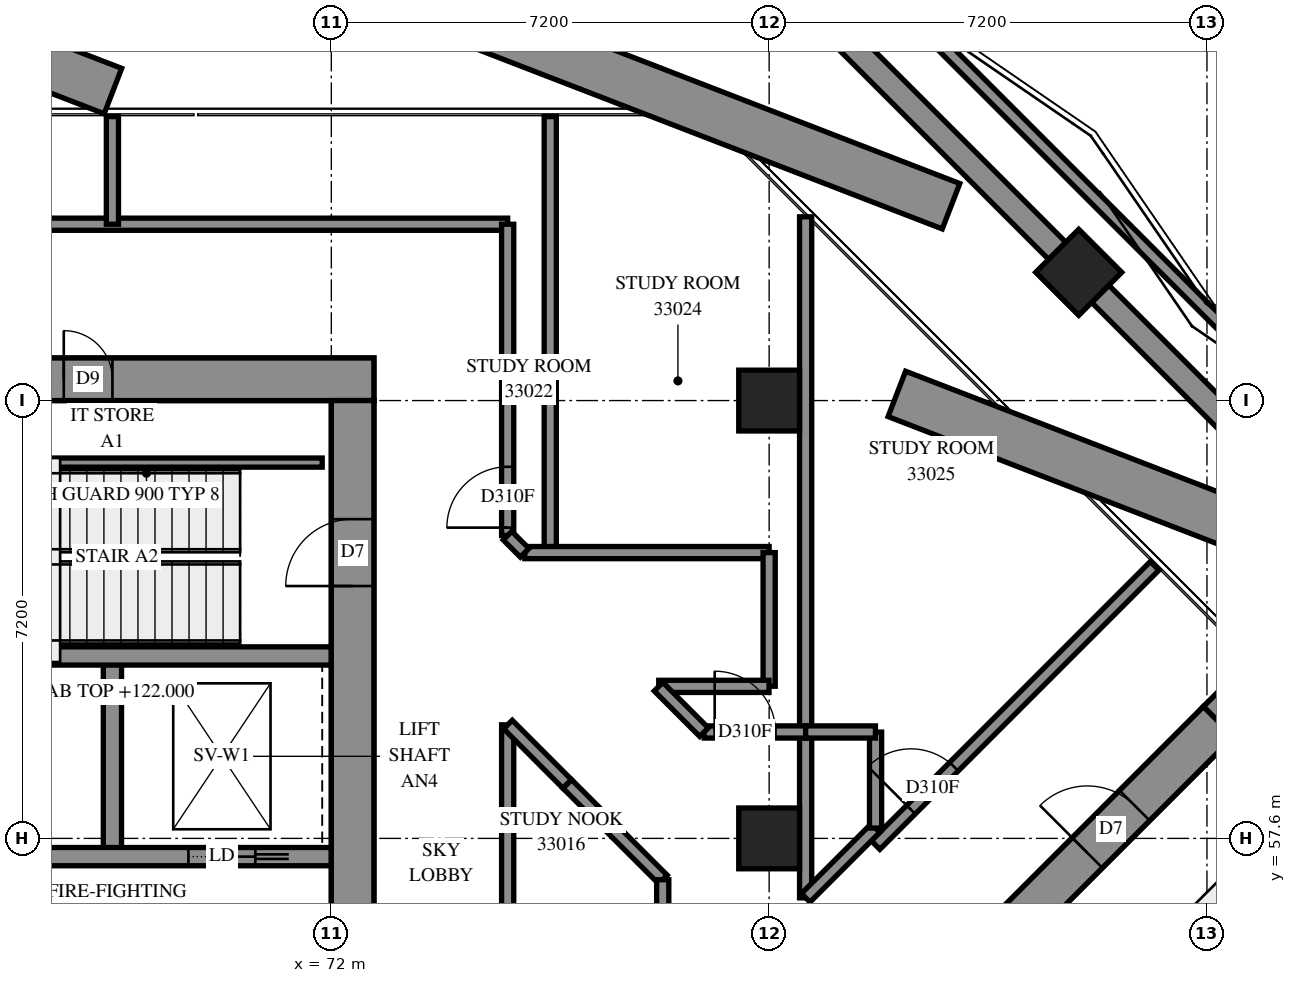
"""IFC4 building model, lengths in metres.
Left out: names, types, materials, properties, quantities, classifications, styles, units other than length and angle.
Written with IfcOpenShell. Run it as: python <this file> out.ifc"""

import sys

from ifc_helpers import new_model, si_unit, direction, frame, frame_2d, origin, origin_2d, place, context, subcontext, project, spatial, polyline, rectangle, outline, extrude, element, fill, save


model = new_model("IFC4")
c1 = context("Model", 3, precision=1e-05, world=origin(), true_north=direction((0.0, 1.0)))
c2 = subcontext(c1, "Body", "Model", "MODEL_VIEW")
j1 = project(units=[si_unit("LENGTHUNIT", "METRE"), si_unit("PLANEANGLEUNIT", "RADIAN")], contexts=[c1])
p1 = place(None, origin())
s1 = spatial("IfcSite", under=j1, at=p1, CompositionType="ELEMENT")
p2 = place(p1, origin())
s2 = spatial("IfcBuilding", under=s1, at=p2, CompositionType="ELEMENT")
p3 = place(p2, frame((0.0, 0.0, 122.0)))
s3 = spatial("IfcBuildingStorey", under=s2, at=p3, CompositionType="ELEMENT", Elevation=122.0)
for number, where, z_axis, x_axis in (
    (1, (79.2, 57.6, 0.0), (0.0, 0.0, 1.0), (1.0, 0.0, 0.0)),
    (2, (79.2, 64.8, 0.0), (0.0, 0.0, 1.0), (1.0, 0.0, 0.0)),
    (3, (84.291, 66.909, 0.0), (0.0, 0.0, 1.0), (0.707, -0.707, 0.0)),
):
    element("IfcColumn", number, at=place(p3, frame(where, z_axis=z_axis, x_axis=x_axis)), inside=s3, PredefinedType="COLUMN", context=c2, shape_type="SweptSolid", body=[
        extrude(rectangle(XDim=1.0, YDim=1.0, at=origin_2d()), origin(), (0.0, 0.0, 1.0), 3.9),
    ])
p4 = place(p3, frame((56.9, 65.15, -0.3), z_axis=(0.0, 0.0, 1.0), x_axis=(1.0, 0.0, 0.0)))
e4 = element("IfcWall", 4, at=p4, inside=s3, PredefinedType="SHEAR", context=c2, shape_type="SweptSolid", body=[
    extrude(rectangle(XDim=15.8, YDim=0.7, at=frame_2d((7.9, 0.0))), origin(), (0.0, 0.0, 1.0), 3.5),
])
p5 = place(p4, frame((10.7, 0.0, 0.3)))
e5 = element("IfcOpeningElement", 5, at=p5, cuts=e4, PredefinedType="OPENING", context=c2, shape_type="SweptSolid", body=[
    extrude(rectangle(XDim=0.8, YDim=2.1, at=frame_2d((0.4, 1.05))), frame((0.0, 0.36, 0.0), z_axis=(0.0, -1.0, 0.0), x_axis=(1.0, 0.0, 0.0)), (0.0, 0.0, 1.0), 0.72),
])
p6 = place(p3, frame((72.35, 50.4, -0.3), z_axis=(0.0, 0.0, 1.0), x_axis=(0.0, 1.0, 0.0)))
e6 = element("IfcWall", 6, at=p6, inside=s3, PredefinedType="SHEAR", context=c2, shape_type="SweptSolid", body=[
    extrude(rectangle(XDim=14.4, YDim=0.7, at=frame_2d((7.2, 0.0))), origin(), (0.0, 0.0, 1.0), 3.5),
])
p7 = place(p6, frame((4.55, 0.0, 0.3)))
e7 = element("IfcOpeningElement", 7, at=p7, cuts=e6, PredefinedType="OPENING", context=c2, shape_type="SweptSolid", body=[
    extrude(rectangle(XDim=1.1, YDim=2.1, at=frame_2d((0.55, 1.05))), frame((0.0, 0.36, 0.0), z_axis=(0.0, -1.0, 0.0), x_axis=(1.0, 0.0, 0.0)), (0.0, 0.0, 1.0), 0.72),
])
p8 = place(p6, frame((11.35, 0.0, 0.3)))
e8 = element("IfcOpeningElement", 8, at=p8, cuts=e6, PredefinedType="OPENING", context=c2, shape_type="SweptSolid", body=[
    extrude(rectangle(XDim=1.1, YDim=2.1, at=frame_2d((0.55, 1.05))), frame((0.0, 0.36, 0.0), z_axis=(0.0, -1.0, 0.0), x_axis=(1.0, 0.0, 0.0)), (0.0, 0.0, 1.0), 0.72),
])
p9 = place(p3, frame((68.4, 57.3, 0.0), z_axis=(0.0, 0.0, 1.0), x_axis=(0.0, 1.0, 0.0)))
e9 = element("IfcWall", 9, at=p9, inside=s3, PredefinedType="SOLIDWALL", context=c2, shape_type="SweptSolid", body=[
    extrude(rectangle(XDim=3.3, YDim=0.3, at=frame_2d((1.65, 0.0))), origin(), (0.0, 0.0, 1.0), 3.9),
])
p10 = place(p3, frame((57.6, 57.3, 0.0), z_axis=(0.0, 0.0, 1.0), x_axis=(1.0, 0.0, 0.0)))
e10 = element("IfcWall", 10, at=p10, inside=s3, PredefinedType="SOLIDWALL", context=c2, shape_type="SweptSolid", body=[
    extrude(rectangle(XDim=14.4, YDim=0.3, at=frame_2d((7.2, 0.0))), origin(), (0.0, 0.0, 1.0), 3.9),
])
p11 = place(p10, frame((12.05, 0.0, 0.0)))
e11 = element("IfcOpeningElement", 11, at=p11, cuts=e10, PredefinedType="OPENING", context=c2, shape_type="SweptSolid", body=[
    extrude(rectangle(XDim=1.1, YDim=2.1, at=frame_2d((0.55, 1.05))), frame((0.0, 0.16, 0.0), z_axis=(0.0, -1.0, 0.0), x_axis=(1.0, 0.0, 0.0)), (0.0, 0.0, 1.0), 0.32),
])
p12 = place(p3, frame((64.8, 60.6, 0.0), z_axis=(0.0, 0.0, 1.0), x_axis=(1.0, 0.0, 0.0)))
e12 = element("IfcWall", 12, at=p12, inside=s3, PredefinedType="SOLIDWALL", context=c2, shape_type="SweptSolid", body=[
    extrude(rectangle(XDim=7.2, YDim=0.3, at=frame_2d((3.6, 0.0))), origin(), (0.0, 0.0, 1.0), 3.9),
])
p13 = place(p3, frame((86.589, 60.014, -0.3), z_axis=(0.0, 0.0, 1.0), x_axis=(0.7071099457, -0.7071036166, 0.0)))
e13 = element("IfcWall", 13, at=p13, inside=s3, PredefinedType="SHEAR", context=c2, shape_type="SweptSolid", body=[
    extrude(rectangle(XDim=15.8, YDim=0.7, at=frame_2d((7.9, 0.0))), origin(), (0.0, 0.0, 1.0), 3.5),
])
p14 = place(p13, frame((10.7, 0.0, 0.3)))
e14 = element("IfcOpeningElement", 14, at=p14, cuts=e13, PredefinedType="OPENING", context=c2, shape_type="SweptSolid", body=[
    extrude(rectangle(XDim=0.8, YDim=2.1, at=frame_2d((0.4, 1.05))), frame((0.0, 0.36, 0.0), z_axis=(0.0, -1.0, 0.0), x_axis=(1.0, 0.0, 0.0)), (0.0, 0.0, 1.0), 0.72),
])
p15 = place(p3, frame((76.407, 49.337, -0.3), z_axis=(0.0, 0.0, 1.0), x_axis=(0.7071067812, 0.7071067812, 0.0)))
e15 = element("IfcWall", 15, at=p15, inside=s3, PredefinedType="SHEAR", context=c2, shape_type="SweptSolid", body=[
    extrude(rectangle(XDim=14.4, YDim=0.7, at=frame_2d((7.2, 0.0))), origin(), (0.0, 0.0, 1.0), 3.5),
])
p16 = place(p15, frame((4.55, 0.0, 0.3)))
e16 = element("IfcOpeningElement", 16, at=p16, cuts=e15, PredefinedType="OPENING", context=c2, shape_type="SweptSolid", body=[
    extrude(rectangle(XDim=1.1, YDim=2.1, at=frame_2d((0.55, 1.05))), frame((0.0, 0.36, 0.0), z_axis=(0.0, -1.0, 0.0), x_axis=(1.0, 0.0, 0.0)), (0.0, 0.0, 1.0), 0.72),
])
p17 = place(p15, frame((11.35, 0.0, 0.3)))
e17 = element("IfcOpeningElement", 17, at=p17, cuts=e15, PredefinedType="OPENING", context=c2, shape_type="SweptSolid", body=[
    extrude(rectangle(XDim=1.1, YDim=2.1, at=frame_2d((0.55, 1.05))), frame((0.0, 0.36, 0.0), z_axis=(0.0, -1.0, 0.0), x_axis=(1.0, 0.0, 0.0)), (0.0, 0.0, 1.0), 0.72),
])
p18 = place(p3, frame((82.191, 67.996, 0.0), z_axis=(0.0, 0.0, 1.0), x_axis=(-0.9328115226, 0.3603646254, 0.0)))
e18 = element("IfcWall", 18, at=p18, inside=s3, PredefinedType="SOLIDWALL", context=c2, shape_type="SweptSolid", body=[
    extrude(rectangle(XDim=8.674, YDim=0.8, at=frame_2d((4.337, 0.0))), origin(), (0.0, 0.0, 1.0), 0.65),
])
p19 = place(p3, frame((87.282, 62.599, 0.0), z_axis=(0.0, 0.0, 1.0), x_axis=(-0.9328056398, 0.360379853, 0.0)))
e19 = element("IfcWall", 19, at=p19, inside=s3, PredefinedType="SOLIDWALL", context=c2, shape_type="SweptSolid", body=[
    extrude(rectangle(XDim=6.413, YDim=0.8, at=frame_2d((3.207, 0.0))), origin(), (0.0, 0.0, 1.0), 0.65),
])
p20 = place(p3, frame((68.408, 69.89, 0.0), z_axis=(0.0, 0.0, 1.0), x_axis=(-0.9327962444, 0.3604041708, 0.0)))
e20 = element("IfcWall", 20, at=p20, inside=s3, PredefinedType="SOLIDWALL", context=c2, shape_type="SweptSolid", body=[
    extrude(rectangle(XDim=1.617, YDim=0.8, at=frame_2d((0.808, 0.0))), origin(), (0.0, 0.0, 1.0), 0.65),
])
p21 = place(p3, frame((107.838, 44.847, 0.0), z_axis=(0.0, 0.0, 1.0), x_axis=(-0.7071067812, 0.7071067812, 0.0)))
e21 = element("IfcWall", 21, at=p21, inside=s3, PredefinedType="SOLIDWALL", context=c2, shape_type="SweptSolid", body=[
    extrude(outline(polyline([(-0.1, -0.1), (39.926, -0.1), (39.843, 0.1), (0.1, 0.1), (-0.1, -0.1)])), origin(), (0.0, 0.0, 1.0), 4.2),
])
p22 = place(p3, frame((64.95, 63.78, 0.0), z_axis=(0.0, 0.0, 1.0), x_axis=(1.0, 0.0, 0.0)))
e22 = element("IfcWall", 22, at=p22, inside=s3, PredefinedType="PARTITIONING", context=c2, shape_type="SweptSolid", body=[
    extrude(rectangle(XDim=6.9, YDim=0.15, at=frame_2d((3.45, 0.0))), origin(), (0.0, 0.0, 1.0), 3.9),
])
p23 = place(p3, frame((54.7, 67.7, 0.0), z_axis=(0.0, 0.0, 1.0), x_axis=(1.0, 0.0, 0.0)))
e23 = element("IfcWall", 23, at=p23, inside=s3, PredefinedType="PARTITIONING", context=c2, shape_type="SweptSolid", body=[
    extrude(rectangle(XDim=20.2, YDim=0.2, at=frame_2d((10.1, 0.0))), origin(), (0.0, 0.0, 1.0), 3.9),
])
p24 = place(p23, frame((8.838, 0.0, 0.0)))
e24 = element("IfcOpeningElement", 24, at=p24, cuts=e23, PredefinedType="OPENING", context=c2, shape_type="SweptSolid", body=[
    extrude(rectangle(XDim=1.0, YDim=2.1, at=frame_2d((0.5, 1.05))), frame((0.0, 0.11, 0.0), z_axis=(0.0, -1.0, 0.0), x_axis=(1.0, 0.0, 0.0)), (0.0, 0.0, 1.0), 0.22),
])
p25 = place(p3, frame((79.8, 59.35, 0.0), z_axis=(0.0, 0.0, 1.0), x_axis=(0.0, 1.0, 0.0)))
e25 = element("IfcWall", 25, at=p25, inside=s3, PredefinedType="PARTITIONING", context=c2, shape_type="SweptSolid", body=[
    extrude(rectangle(XDim=8.472, YDim=0.2, at=frame_2d((4.236, 0.0))), origin(), (0.0, 0.0, 1.0), 3.9),
])
p26 = place(p3, frame((75.6, 62.3, 0.0), z_axis=(0.0, 0.0, 1.0), x_axis=(0.0, 1.0, 0.0)))
e26 = element("IfcWall", 26, at=p26, inside=s3, PredefinedType="PARTITIONING", context=c2, shape_type="SweptSolid", body=[
    extrude(rectangle(XDim=7.17, YDim=0.2, at=frame_2d((3.585, 0.0))), origin(), (0.0, 0.0, 1.0), 3.9),
])
p27 = place(p3, frame((80.95, 57.49, 0.0), z_axis=(0.0, 0.0, 1.0), x_axis=(0.7069527442, 0.7072607846, 0.0)))
e27 = element("IfcWall", 27, at=p27, inside=s3, PredefinedType="PARTITIONING", context=c2, shape_type="SweptSolid", body=[
    extrude(rectangle(XDim=6.493, YDim=0.2, at=frame_2d((3.246, 0.0))), origin(), (0.0, 0.0, 1.0), 3.9),
])
p28 = place(p27, frame((0.824, 0.0, 0.0)))
e28 = element("IfcOpeningElement", 28, at=p28, cuts=e27, PredefinedType="OPENING", context=c2, shape_type="SweptSolid", body=[
    extrude(rectangle(XDim=1.0, YDim=2.1, at=frame_2d((0.5, 1.05))), frame((0.0, 0.11, 0.0), z_axis=(0.0, -1.0, 0.0), x_axis=(1.0, 0.0, 0.0)), (0.0, 0.0, 1.0), 0.22),
])
p29 = place(p3, frame((74.9, 62.582, 0.0), z_axis=(0.0, 0.0, 1.0), x_axis=(0.0, 1.0, 0.0)))
e29 = element("IfcWall", 29, at=p29, inside=s3, PredefinedType="PARTITIONING", context=c2, shape_type="SweptSolid", body=[
    extrude(rectangle(XDim=5.118, YDim=0.2, at=frame_2d((2.559, 0.0))), origin(), (0.0, 0.0, 1.0), 3.9),
])
p30 = place(p29, frame((0.129, 0.0, 0.0)))
e30 = element("IfcOpeningElement", 30, at=p30, cuts=e29, PredefinedType="OPENING", context=c2, shape_type="SweptSolid", body=[
    extrude(rectangle(XDim=1.0, YDim=2.1, at=frame_2d((0.5, 1.05))), frame((0.0, 0.11, 0.0), z_axis=(0.0, -1.0, 0.0), x_axis=(1.0, 0.0, 0.0)), (0.0, 0.0, 1.0), 0.22),
])
p31 = place(p3, frame((74.9, 55.102, 0.0), z_axis=(0.0, 0.0, 1.0), x_axis=(0.0, 1.0, 0.0)))
e31 = element("IfcWall", 31, at=p31, inside=s3, PredefinedType="PARTITIONING", context=c2, shape_type="SweptSolid", body=[
    extrude(rectangle(XDim=4.366, YDim=0.2, at=frame_2d((2.183, 0.0))), origin(), (0.0, 0.0, 1.0), 3.9),
])
p32 = place(p3, frame((75.182, 62.3, 0.0), z_axis=(0.0, 0.0, 1.0), x_axis=(1.0, 0.0, 0.0)))
e32 = element("IfcWall", 32, at=p32, inside=s3, PredefinedType="PARTITIONING", context=c2, shape_type="SweptSolid", body=[
    extrude(rectangle(XDim=4.018, YDim=0.2, at=frame_2d((2.009, 0.0))), origin(), (0.0, 0.0, 1.0), 3.9),
])
p33 = place(p3, frame((79.8, 56.622, 0.0), z_axis=(0.0, 0.0, 1.0), x_axis=(0.0, 1.0, 0.0)))
e33 = element("IfcWall", 33, at=p33, inside=s3, PredefinedType="PARTITIONING", context=c2, shape_type="SweptSolid", body=[
    extrude(rectangle(XDim=2.728, YDim=0.2, at=frame_2d((1.364, 0.0))), origin(), (0.0, 0.0, 1.0), 3.9),
])
p34 = place(p3, frame((75.879, 58.497, 0.0), z_axis=(0.0, 0.0, 1.0), x_axis=(0.7075561657, -0.7066571109, 0.0)))
e34 = element("IfcWall", 34, at=p34, inside=s3, PredefinedType="PARTITIONING", context=c2, shape_type="SweptSolid", body=[
    extrude(rectangle(XDim=2.225, YDim=0.2, at=frame_2d((1.112, 0.0))), origin(), (0.0, 0.0, 1.0), 3.9),
])
p35 = place(p3, frame((79.2, 60.102, 0.0), z_axis=(0.0, 0.0, 1.0), x_axis=(0.0, 1.0, 0.0)))
e35 = element("IfcWall", 35, at=p35, inside=s3, PredefinedType="PARTITIONING", context=c2, shape_type="SweptSolid", body=[
    extrude(rectangle(XDim=2.198, YDim=0.2, at=frame_2d((1.099, 0.0))), origin(), (0.0, 0.0, 1.0), 3.9),
])
p36 = place(p3, frame((77.384, 60.1, 0.0), z_axis=(0.0, 0.0, 1.0), x_axis=(1.0, 0.0, 0.0)))
e36 = element("IfcWall", 36, at=p36, inside=s3, PredefinedType="PARTITIONING", context=c2, shape_type="SweptSolid", body=[
    extrude(rectangle(XDim=1.814, YDim=0.2, at=frame_2d((0.907, 0.0))), origin(), (0.0, 0.0, 1.0), 3.9),
])
p37 = place(p3, frame((68.4, 67.7, 0.0), z_axis=(0.0, 0.0, 1.0), x_axis=(0.0, 1.0, 0.0)))
e37 = element("IfcWall", 37, at=p37, inside=s3, PredefinedType="PARTITIONING", context=c2, shape_type="SweptSolid", body=[
    extrude(rectangle(XDim=1.77, YDim=0.2, at=frame_2d((0.885, 0.0))), origin(), (0.0, 0.0, 1.0), 3.9),
])
p38 = place(p3, frame((78.132, 59.35, 0.0), z_axis=(0.0, 0.0, 1.0), x_axis=(1.0, 0.0, 0.0)))
e38 = element("IfcWall", 38, at=p38, inside=s3, PredefinedType="PARTITIONING", context=c2, shape_type="SweptSolid", body=[
    extrude(rectangle(XDim=1.668, YDim=0.2, at=frame_2d((0.834, 0.0))), origin(), (0.0, 0.0, 1.0), 3.9),
])
p39 = place(p38, frame((0.172, 0.0, 0.0)))
e39 = element("IfcOpeningElement", 39, at=p39, cuts=e38, PredefinedType="OPENING", context=c2, shape_type="SweptSolid", body=[
    extrude(rectangle(XDim=1.0, YDim=2.1, at=frame_2d((0.5, 1.05))), frame((0.0, 0.11, 0.0), z_axis=(0.0, -1.0, 0.0), x_axis=(1.0, 0.0, 0.0)), (0.0, 0.0, 1.0), 0.22),
])
p40 = place(p3, frame((79.802, 56.623, 0.0), z_axis=(0.0, 0.0, 1.0), x_axis=(0.7071067812, 0.7071067812, 0.0)))
e40 = element("IfcWall", 40, at=p40, inside=s3, PredefinedType="PARTITIONING", context=c2, shape_type="SweptSolid", body=[
    extrude(rectangle(XDim=1.623, YDim=0.2, at=frame_2d((0.812, 0.0))), origin(), (0.0, 0.0, 1.0), 3.9),
])
p41 = place(p3, frame((80.95, 57.77, 0.0), z_axis=(0.0, 0.0, 1.0), x_axis=(0.0, 1.0, 0.0)))
e41 = element("IfcWall", 41, at=p41, inside=s3, PredefinedType="PARTITIONING", context=c2, shape_type="SweptSolid", body=[
    extrude(rectangle(XDim=1.578, YDim=0.2, at=frame_2d((0.789, 0.0))), origin(), (0.0, 0.0, 1.0), 3.9),
])
p42 = place(p3, frame((74.904, 59.472, 0.0), z_axis=(0.0, 0.0, 1.0), x_axis=(0.7063811719, -0.7078316466, 0.0)))
e42 = element("IfcWall", 42, at=p42, inside=s3, PredefinedType="PARTITIONING", context=c2, shape_type="SweptSolid", body=[
    extrude(rectangle(XDim=1.379, YDim=0.2, at=frame_2d((0.69, 0.0))), origin(), (0.0, 0.0, 1.0), 3.9),
])
p43 = place(p3, frame((79.8, 59.35, 0.0), z_axis=(0.0, 0.0, 1.0), x_axis=(1.0, 0.0, 0.0)))
e43 = element("IfcWall", 43, at=p43, inside=s3, PredefinedType="PARTITIONING", context=c2, shape_type="SweptSolid", body=[
    extrude(rectangle(XDim=1.148, YDim=0.2, at=frame_2d((0.574, 0.0))), origin(), (0.0, 0.0, 1.0), 3.9),
])
p44 = place(p3, frame((77.45, 55.852, 0.0), z_axis=(0.0, 0.0, 1.0), x_axis=(0.0, 1.0, 0.0)))
e44 = element("IfcWall", 44, at=p44, inside=s3, PredefinedType="PARTITIONING", context=c2, shape_type="SweptSolid", body=[
    extrude(rectangle(XDim=1.068, YDim=0.2, at=frame_2d((0.534, 0.0))), origin(), (0.0, 0.0, 1.0), 3.9),
])
p45 = place(p3, frame((77.381, 60.095, 0.0), z_axis=(0.0, 0.0, 1.0), x_axis=(0.7071067812, -0.7071067812, 0.0)))
e45 = element("IfcWall", 45, at=p45, inside=s3, PredefinedType="PARTITIONING", context=c2, shape_type="SweptSolid", body=[
    extrude(rectangle(XDim=1.058, YDim=0.2, at=frame_2d((0.529, 0.0))), origin(), (0.0, 0.0, 1.0), 3.9),
])
p46 = place(p3, frame((74.897, 62.579, 0.0), z_axis=(0.0, 0.0, 1.0), x_axis=(0.7071067812, -0.7071067812, 0.0)))
e46 = element("IfcWall", 46, at=p46, inside=s3, PredefinedType="PARTITIONING", context=c2, shape_type="SweptSolid", body=[
    extrude(rectangle(XDim=0.399, YDim=0.2, at=frame_2d((0.199, 0.0))), origin(), (0.0, 0.0, 1.0), 3.9),
])
p47 = place(p5, origin())
e47 = element("IfcDoor", 47, at=p47, inside=s3, OperationType="SINGLE_SWING_RIGHT", PredefinedType="DOOR", context=c2, shape_type="SweptSolid", body=[
    extrude(rectangle(XDim=0.8, YDim=2.1, at=frame_2d((0.4, 1.05))), frame((0.0, -0.29, 0.0), z_axis=(0.0, -1.0, 0.0), x_axis=(1.0, 0.0, 0.0)), (0.0, 0.0, 1.0), 0.05),
])
fill(e5, e47)
p48 = place(p8, origin())
e48 = element("IfcDoor", 48, at=p48, inside=s3, OperationType="SINGLE_SWING_RIGHT", PredefinedType="DOOR", context=c2, shape_type="SweptSolid", body=[
    extrude(rectangle(XDim=1.1, YDim=2.1, at=frame_2d((0.55, 1.05))), frame((0.0, 0.025, 0.0), z_axis=(0.0, -1.0, 0.0), x_axis=(1.0, 0.0, 0.0)), (0.0, 0.0, 1.0), 0.05),
])
fill(e8, e48)
p49 = place(p11, origin())
e49 = element("IfcDoor", 49, at=p49, inside=s3, OperationType="SLIDING_TO_RIGHT", PredefinedType="DOOR", context=c2, shape_type="SweptSolid", body=[
    extrude(rectangle(XDim=1.1, YDim=2.1, at=frame_2d((0.55, 1.05))), frame((0.0, 0.025, 0.0), z_axis=(0.0, -1.0, 0.0), x_axis=(1.0, 0.0, 0.0)), (0.0, 0.0, 1.0), 0.05),
])
fill(e11, e49)
p50 = place(p17, origin())
e50 = element("IfcDoor", 50, at=p50, inside=s3, OperationType="SINGLE_SWING_LEFT", PredefinedType="DOOR", context=c2, shape_type="SweptSolid", body=[
    extrude(rectangle(XDim=1.1, YDim=2.1, at=frame_2d((0.55, 1.05))), frame((0.0, 0.025, 0.0), z_axis=(0.0, -1.0, 0.0), x_axis=(1.0, 0.0, 0.0)), (0.0, 0.0, 1.0), 0.05),
])
fill(e17, e50)
p51 = place(p30, origin())
e51 = element("IfcDoor", 51, at=p51, inside=s3, OperationType="SINGLE_SWING_LEFT", PredefinedType="DOOR", context=c2, shape_type="SweptSolid", body=[
    extrude(rectangle(XDim=1.0, YDim=2.1, at=frame_2d((0.5, 1.05))), frame((0.0, 0.025, 0.0), z_axis=(0.0, -1.0, 0.0), x_axis=(1.0, 0.0, 0.0)), (0.0, 0.0, 1.0), 0.05),
])
fill(e30, e51)
p52 = place(p39, origin())
e52 = element("IfcDoor", 52, at=p52, inside=s3, OperationType="SINGLE_SWING_LEFT", PredefinedType="DOOR", context=c2, shape_type="SweptSolid", body=[
    extrude(rectangle(XDim=1.0, YDim=2.1, at=frame_2d((0.5, 1.05))), frame((0.0, 0.025, 0.0), z_axis=(0.0, -1.0, 0.0), x_axis=(1.0, 0.0, 0.0)), (0.0, 0.0, 1.0), 0.05),
])
fill(e39, e52)
p53 = place(p28, origin())
e53 = element("IfcDoor", 53, at=p53, inside=s3, OperationType="SINGLE_SWING_RIGHT", PredefinedType="DOOR", context=c2, shape_type="SweptSolid", body=[
    extrude(rectangle(XDim=1.0, YDim=2.1, at=frame_2d((0.5, 1.05))), frame((0.0, 0.025, 0.0), z_axis=(0.0, -1.0, 0.0), x_axis=(1.0, 0.0, 0.0)), (0.0, 0.0, 1.0), 0.05),
])
fill(e28, e53)
save(model, sys.argv[1])
